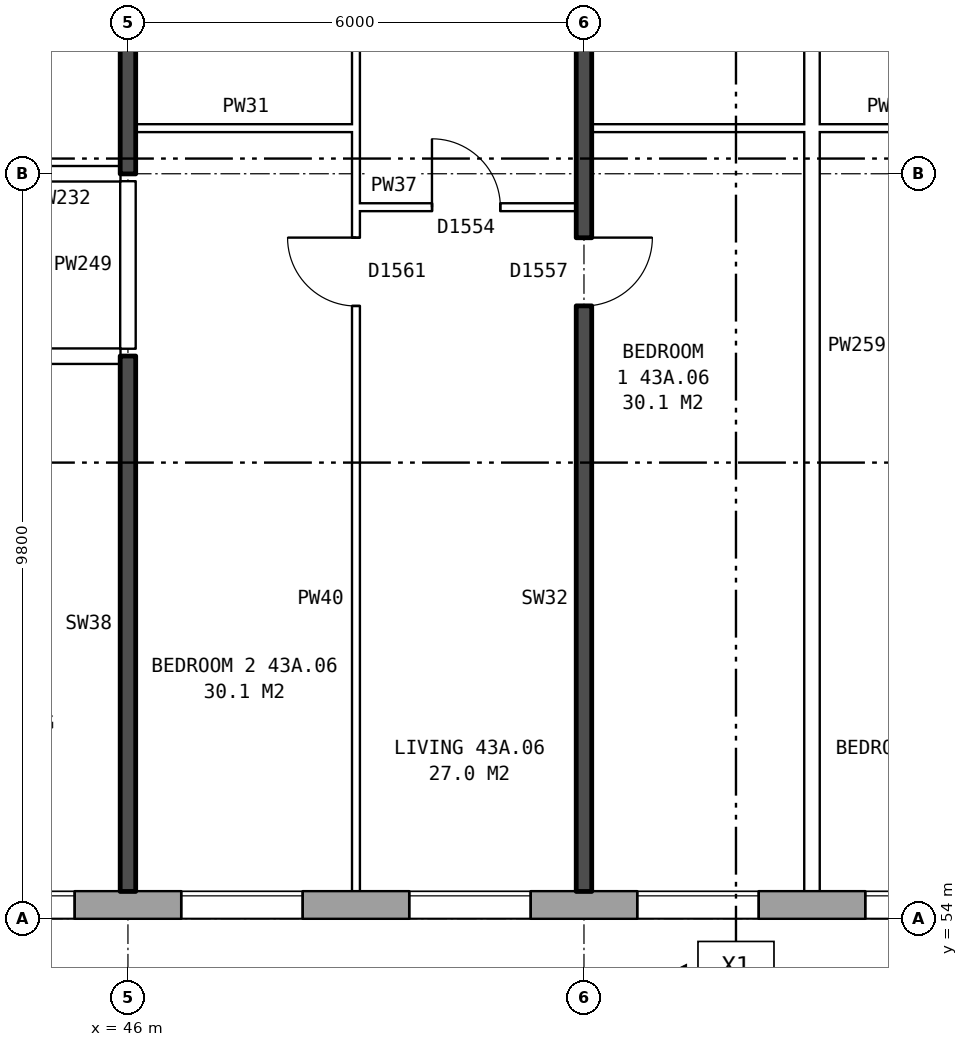
"""IFC4 building model, lengths in metres.
Left out: names, types, materials, properties, quantities, classifications, styles, units other than length and angle.
Written with IfcOpenShell. Run it as: python <this file> out.ifc"""

import sys

from ifc_helpers import new_model, si_unit, direction, frame, frame_2d, origin, place, context, subcontext, project, spatial, rectangle, extrude, element, fill, save


model = new_model("IFC4")
c1 = context("Model", 3, precision=1e-05, world=origin(), true_north=direction((0.0, 1.0)))
c2 = subcontext(c1, "Body", "Model", "MODEL_VIEW")
j1 = project(units=[si_unit("LENGTHUNIT", "METRE"), si_unit("PLANEANGLEUNIT", "RADIAN")], contexts=[c1])
p1 = place(None, origin())
s1 = spatial("IfcSite", under=j1, at=p1, CompositionType="ELEMENT")
p2 = place(p1, origin())
s2 = spatial("IfcBuilding", under=s1, at=p2, CompositionType="ELEMENT")
p3 = place(p2, frame((0.0, 0.0, 154.7)))
s3 = spatial("IfcBuildingStorey", under=s2, at=p3, CompositionType="ELEMENT", Elevation=154.7)
p4 = place(p3, frame((31.575, 54.18, 0.0), z_axis=(0.0, 0.0, 1.0), x_axis=(1.0, 0.0, 0.0)))
e1 = element("IfcWall", 1, at=p4, inside=s3, PredefinedType="STANDARD", context=c2, shape_type="SweptSolid", body=[
    extrude(rectangle(XDim=41.351, YDim=0.36, at=frame_2d((20.675, 0.0))), origin(), (0.0, 0.0, 1.0), 2.85),
])
p5 = place(p4, frame((3.125, 0.0, 0.8)))
e2 = element("IfcOpeningElement", 2, at=p5, cuts=e1, PredefinedType="OPENING", context=c2, shape_type="SweptSolid", body=[
    extrude(rectangle(XDim=1.6, YDim=1.8, at=frame_2d((0.8, 0.9))), frame((0.0, 0.19, 0.0), z_axis=(0.0, -1.0, 0.0), x_axis=(1.0, 0.0, 0.0)), (0.0, 0.0, 1.0), 0.38),
])
p6 = place(p4, frame((5.025, 0.0, 1.0)))
e3 = element("IfcOpeningElement", 3, at=p6, cuts=e1, PredefinedType="OPENING", context=c2, shape_type="SweptSolid", body=[
    extrude(rectangle(XDim=1.0, YDim=1.5, at=frame_2d((0.5, 0.75))), frame((0.0, 0.19, 0.0), z_axis=(0.0, -1.0, 0.0), x_axis=(1.0, 0.0, 0.0)), (0.0, 0.0, 1.0), 0.38),
])
p7 = place(p4, frame((9.125, 0.0, 0.8)))
e4 = element("IfcOpeningElement", 4, at=p7, cuts=e1, PredefinedType="OPENING", context=c2, shape_type="SweptSolid", body=[
    extrude(rectangle(XDim=1.6, YDim=1.8, at=frame_2d((0.8, 0.9))), frame((0.0, 0.19, 0.0), z_axis=(0.0, -1.0, 0.0), x_axis=(1.0, 0.0, 0.0)), (0.0, 0.0, 1.0), 0.38),
])
p8 = place(p4, frame((12.125, 0.0, 0.8)))
e5 = element("IfcOpeningElement", 5, at=p8, cuts=e1, PredefinedType="OPENING", context=c2, shape_type="SweptSolid", body=[
    extrude(rectangle(XDim=1.6, YDim=1.8, at=frame_2d((0.8, 0.9))), frame((0.0, 0.19, 0.0), z_axis=(0.0, -1.0, 0.0), x_axis=(1.0, 0.0, 0.0)), (0.0, 0.0, 1.0), 0.38),
])
p9 = place(p4, frame((15.125, 0.0, 0.8)))
e6 = element("IfcOpeningElement", 6, at=p9, cuts=e1, PredefinedType="OPENING", context=c2, shape_type="SweptSolid", body=[
    extrude(rectangle(XDim=1.6, YDim=1.8, at=frame_2d((0.8, 0.9))), frame((0.0, 0.19, 0.0), z_axis=(0.0, -1.0, 0.0), x_axis=(1.0, 0.0, 0.0)), (0.0, 0.0, 1.0), 0.38),
])
p10 = place(p4, frame((18.125, 0.0, 0.8)))
e7 = element("IfcOpeningElement", 7, at=p10, cuts=e1, PredefinedType="OPENING", context=c2, shape_type="SweptSolid", body=[
    extrude(rectangle(XDim=1.6, YDim=1.8, at=frame_2d((0.8, 0.9))), frame((0.0, 0.19, 0.0), z_axis=(0.0, -1.0, 0.0), x_axis=(1.0, 0.0, 0.0)), (0.0, 0.0, 1.0), 0.38),
])
p11 = place(p4, frame((21.125, 0.0, 0.8)))
e8 = element("IfcOpeningElement", 8, at=p11, cuts=e1, PredefinedType="OPENING", context=c2, shape_type="SweptSolid", body=[
    extrude(rectangle(XDim=1.6, YDim=1.8, at=frame_2d((0.8, 0.9))), frame((0.0, 0.19, 0.0), z_axis=(0.0, -1.0, 0.0), x_axis=(1.0, 0.0, 0.0)), (0.0, 0.0, 1.0), 0.38),
])
p12 = place(p4, frame((24.125, 0.0, 0.8)))
e9 = element("IfcOpeningElement", 9, at=p12, cuts=e1, PredefinedType="OPENING", context=c2, shape_type="SweptSolid", body=[
    extrude(rectangle(XDim=1.6, YDim=1.8, at=frame_2d((0.8, 0.9))), frame((0.0, 0.19, 0.0), z_axis=(0.0, -1.0, 0.0), x_axis=(1.0, 0.0, 0.0)), (0.0, 0.0, 1.0), 0.38),
])
p13 = place(p4, frame((27.125, 0.0, 0.8)))
e10 = element("IfcOpeningElement", 10, at=p13, cuts=e1, PredefinedType="OPENING", context=c2, shape_type="SweptSolid", body=[
    extrude(rectangle(XDim=1.6, YDim=1.8, at=frame_2d((0.8, 0.9))), frame((0.0, 0.19, 0.0), z_axis=(0.0, -1.0, 0.0), x_axis=(1.0, 0.0, 0.0)), (0.0, 0.0, 1.0), 0.38),
])
p14 = place(p4, frame((30.125, 0.0, 0.8)))
e11 = element("IfcOpeningElement", 11, at=p14, cuts=e1, PredefinedType="OPENING", context=c2, shape_type="SweptSolid", body=[
    extrude(rectangle(XDim=1.6, YDim=1.8, at=frame_2d((0.8, 0.9))), frame((0.0, 0.19, 0.0), z_axis=(0.0, -1.0, 0.0), x_axis=(1.0, 0.0, 0.0)), (0.0, 0.0, 1.0), 0.38),
])
p15 = place(p4, frame((34.425, 0.0, 1.7)))
e12 = element("IfcOpeningElement", 12, at=p15, cuts=e1, PredefinedType="OPENING", context=c2, shape_type="SweptSolid", body=[
    extrude(rectangle(XDim=1.4, YDim=0.9, at=frame_2d((0.7, 0.45))), frame((0.0, 0.19, 0.0), z_axis=(0.0, -1.0, 0.0), x_axis=(1.0, 0.0, 0.0)), (0.0, 0.0, 1.0), 0.38),
])
p16 = place(p4, frame((36.125, 0.0, 0.8)))
e13 = element("IfcOpeningElement", 13, at=p16, cuts=e1, PredefinedType="OPENING", context=c2, shape_type="SweptSolid", body=[
    extrude(rectangle(XDim=1.6, YDim=1.8, at=frame_2d((0.8, 0.9))), frame((0.0, 0.19, 0.0), z_axis=(0.0, -1.0, 0.0), x_axis=(1.0, 0.0, 0.0)), (0.0, 0.0, 1.0), 0.38),
])
p17 = place(p4, frame((39.125, 0.0, 0.8)))
e14 = element("IfcOpeningElement", 14, at=p17, cuts=e1, PredefinedType="OPENING", context=c2, shape_type="SweptSolid", body=[
    extrude(rectangle(XDim=1.6, YDim=1.8, at=frame_2d((0.8, 0.9))), frame((0.0, 0.19, 0.0), z_axis=(0.0, -1.0, 0.0), x_axis=(1.0, 0.0, 0.0)), (0.0, 0.0, 1.0), 0.38),
])
p18 = place(p4, frame((6.325, 0.0, 1.7)))
e15 = element("IfcOpeningElement", 15, at=p18, cuts=e1, PredefinedType="OPENING", context=c2, shape_type="SweptSolid", body=[
    extrude(rectangle(XDim=0.6, YDim=0.9, at=frame_2d((0.3, 0.45))), frame((0.0, 0.19, 0.0), z_axis=(0.0, -1.0, 0.0), x_axis=(1.0, 0.0, 0.0)), (0.0, 0.0, 1.0), 0.38),
])
p19 = place(p3, frame((28.86, 61.4, 0.0), z_axis=(0.0, 0.0, 1.0), x_axis=(1.0, 0.0, 0.0)))
e16 = element("IfcWall", 16, at=p19, inside=s3, PredefinedType="PARTITIONING", context=c2, shape_type="SweptSolid", body=[
    extrude(rectangle(XDim=17.04, YDim=0.2, at=frame_2d((8.52, 0.0))), origin(), (0.0, 0.0, 1.0), 2.85),
])
p20 = place(p19, frame((14.59, 0.0, 0.0)))
e17 = element("IfcOpeningElement", 17, at=p20, cuts=e16, PredefinedType="OPENING", context=c2, shape_type="SweptSolid", body=[
    extrude(rectangle(XDim=1.0, YDim=2.1, at=frame_2d((0.5, 1.05))), frame((0.0, 0.11, 0.0), z_axis=(0.0, -1.0, 0.0), x_axis=(1.0, 0.0, 0.0)), (0.0, 0.0, 1.0), 0.22),
])
p21 = place(p19, frame((7.64, 0.0, 0.0)))
e18 = element("IfcOpeningElement", 18, at=p21, cuts=e16, PredefinedType="OPENING", context=c2, shape_type="SweptSolid", body=[
    extrude(rectangle(XDim=1.0, YDim=2.1, at=frame_2d((0.5, 1.05))), frame((0.0, 0.11, 0.0), z_axis=(0.0, -1.0, 0.0), x_axis=(1.0, 0.0, 0.0)), (0.0, 0.0, 1.0), 0.22),
])
p22 = place(p3, frame((49.0, 63.36, 0.0), z_axis=(0.0, 0.0, 1.0), x_axis=(1.0, 0.0, 0.0)))
e19 = element("IfcWall", 19, at=p22, inside=s3, PredefinedType="PARTITIONING", context=c2, shape_type="SweptSolid", body=[
    extrude(rectangle(XDim=2.9, YDim=0.1, at=frame_2d((1.45, 0.0))), origin(), (0.0, 0.0, 1.0), 2.85),
])
p23 = place(p22, frame((1.0, 0.0, 0.0)))
e20 = element("IfcOpeningElement", 20, at=p23, cuts=e19, PredefinedType="OPENING", context=c2, shape_type="SweptSolid", body=[
    extrude(rectangle(XDim=0.9, YDim=2.1, at=frame_2d((0.45, 1.05))), frame((0.0, 0.06, 0.0), z_axis=(0.0, -1.0, 0.0), x_axis=(1.0, 0.0, 0.0)), (0.0, 0.0, 1.0), 0.12),
])
p24 = place(p3, frame((44.36, 63.8, 0.0), z_axis=(0.0, 0.0, 1.0), x_axis=(1.0, 0.0, 0.0)))
e21 = element("IfcWall", 21, at=p24, inside=s3, PredefinedType="PARTITIONING", context=c2, shape_type="SweptSolid", body=[
    extrude(rectangle(XDim=1.54, YDim=0.2, at=frame_2d((0.77, 0.0))), origin(), (0.0, 0.0, 1.0), 2.85),
])
p25 = place(p3, frame((46.1, 64.4, 0.0), z_axis=(0.0, 0.0, 1.0), x_axis=(1.0, 0.0, 0.0)))
e22 = element("IfcWall", 22, at=p25, inside=s3, PredefinedType="PARTITIONING", context=c2, shape_type="SweptSolid", body=[
    extrude(rectangle(XDim=2.9, YDim=0.1, at=frame_2d((1.45, 0.0))), origin(), (0.0, 0.0, 1.0), 2.85),
])
p26 = place(p3, frame((52.1, 64.4, 0.0), z_axis=(0.0, 0.0, 1.0), x_axis=(1.0, 0.0, 0.0)))
e23 = element("IfcWall", 23, at=p26, inside=s3, PredefinedType="PARTITIONING", context=c2, shape_type="SweptSolid", body=[
    extrude(rectangle(XDim=5.8, YDim=0.1, at=frame_2d((2.9, 0.0))), origin(), (0.0, 0.0, 1.0), 2.85),
])
p27 = place(p3, frame((46.0, 54.36, 0.0), z_axis=(0.0, 0.0, 1.0), x_axis=(0.0, 1.0, 0.0)))
e24 = element("IfcWall", 24, at=p27, inside=s3, PredefinedType="SOLIDWALL", context=c2, shape_type="SweptSolid", body=[
    extrude(rectangle(XDim=7.04, YDim=0.2, at=frame_2d((3.52, 0.0))), origin(), (0.0, 0.0, 1.0), 2.85),
])
p28 = place(p3, frame((46.0, 61.5, 0.0), z_axis=(0.0, 0.0, 1.0), x_axis=(0.0, 1.0, 0.0)))
e25 = element("IfcWall", 25, at=p28, inside=s3, PredefinedType="PARTITIONING", context=c2, shape_type="SweptSolid", body=[
    extrude(rectangle(XDim=2.2, YDim=0.2, at=frame_2d((1.1, 0.0))), origin(), (0.0, 0.0, 1.0), 2.85),
])
p29 = place(p3, frame((46.0, 63.8, 0.0), z_axis=(0.0, 0.0, 1.0), x_axis=(0.0, 1.0, 0.0)))
e26 = element("IfcWall", 26, at=p29, inside=s3, PredefinedType="SOLIDWALL", context=c2, shape_type="SweptSolid", body=[
    extrude(rectangle(XDim=5.0, YDim=0.2, at=frame_2d((2.5, 0.0))), origin(), (0.0, 0.0, 1.0), 2.85),
])
p30 = place(p3, frame((49.0, 54.36, 0.0), z_axis=(0.0, 0.0, 1.0), x_axis=(0.0, 1.0, 0.0)))
e27 = element("IfcWall", 27, at=p30, inside=s3, PredefinedType="PARTITIONING", context=c2, shape_type="SweptSolid", body=[
    extrude(rectangle(XDim=14.34, YDim=0.1, at=frame_2d((7.17, 0.0))), origin(), (0.0, 0.0, 1.0), 2.85),
])
p31 = place(p30, frame((7.7, 0.0, 0.0)))
e28 = element("IfcOpeningElement", 28, at=p31, cuts=e27, PredefinedType="OPENING", context=c2, shape_type="SweptSolid", body=[
    extrude(rectangle(XDim=0.9, YDim=2.1, at=frame_2d((0.45, 1.05))), frame((0.0, 0.06, 0.0), z_axis=(0.0, -1.0, 0.0), x_axis=(1.0, 0.0, 0.0)), (0.0, 0.0, 1.0), 0.12),
])
p32 = place(p30, frame((13.04, 0.0, 0.0)))
e29 = element("IfcOpeningElement", 29, at=p32, cuts=e27, PredefinedType="OPENING", context=c2, shape_type="SweptSolid", body=[
    extrude(rectangle(XDim=0.9, YDim=2.1, at=frame_2d((0.45, 1.05))), frame((0.0, 0.06, 0.0), z_axis=(0.0, -1.0, 0.0), x_axis=(1.0, 0.0, 0.0)), (0.0, 0.0, 1.0), 0.12),
])
p33 = place(p3, frame((52.0, 54.36, 0.0), z_axis=(0.0, 0.0, 1.0), x_axis=(0.0, 1.0, 0.0)))
e30 = element("IfcWall", 30, at=p33, inside=s3, PredefinedType="SOLIDWALL", context=c2, shape_type="SweptSolid", body=[
    extrude(rectangle(XDim=14.44, YDim=0.2, at=frame_2d((7.22, 0.0))), origin(), (0.0, 0.0, 1.0), 2.85),
])
p34 = place(p33, frame((7.7, 0.0, 0.0)))
e31 = element("IfcOpeningElement", 31, at=p34, cuts=e30, PredefinedType="OPENING", context=c2, shape_type="SweptSolid", body=[
    extrude(rectangle(XDim=0.9, YDim=2.1, at=frame_2d((0.45, 1.05))), frame((0.0, 0.11, 0.0), z_axis=(0.0, -1.0, 0.0), x_axis=(1.0, 0.0, 0.0)), (0.0, 0.0, 1.0), 0.22),
])
p35 = place(p33, frame((13.14, 0.0, 0.0)))
e32 = element("IfcOpeningElement", 32, at=p35, cuts=e30, PredefinedType="OPENING", context=c2, shape_type="SweptSolid", body=[
    extrude(rectangle(XDim=0.9, YDim=2.1, at=frame_2d((0.45, 1.05))), frame((0.0, 0.11, 0.0), z_axis=(0.0, -1.0, 0.0), x_axis=(1.0, 0.0, 0.0)), (0.0, 0.0, 1.0), 0.22),
])
p36 = place(p3, frame((55.0, 54.36, 0.0), z_axis=(0.0, 0.0, 1.0), x_axis=(0.0, 1.0, 0.0)))
e33 = element("IfcWall", 33, at=p36, inside=s3, PredefinedType="PARTITIONING", context=c2, shape_type="SweptSolid", body=[
    extrude(rectangle(XDim=14.34, YDim=0.2, at=frame_2d((7.17, 0.0))), origin(), (0.0, 0.0, 1.0), 2.85),
])
p37 = place(p8, origin())
e34 = element("IfcWindow", 34, at=p37, inside=s3, PartitioningType="SINGLE_PANEL", PredefinedType="WINDOW", context=c2, shape_type="SweptSolid", body=[
    extrude(rectangle(XDim=1.6, YDim=1.8, at=frame_2d((0.8, 0.9))), frame((0.0, 0.15, 0.0), z_axis=(0.0, -1.0, 0.0), x_axis=(1.0, 0.0, 0.0)), (0.0, 0.0, 1.0), 0.06),
])
fill(e5, e34)
p38 = place(p9, origin())
e35 = element("IfcWindow", 35, at=p38, inside=s3, PartitioningType="SINGLE_PANEL", PredefinedType="WINDOW", context=c2, shape_type="SweptSolid", body=[
    extrude(rectangle(XDim=1.6, YDim=1.8, at=frame_2d((0.8, 0.9))), frame((0.0, 0.15, 0.0), z_axis=(0.0, -1.0, 0.0), x_axis=(1.0, 0.0, 0.0)), (0.0, 0.0, 1.0), 0.06),
])
fill(e6, e35)
p39 = place(p10, origin())
e36 = element("IfcWindow", 36, at=p39, inside=s3, PartitioningType="SINGLE_PANEL", PredefinedType="WINDOW", context=c2, shape_type="SweptSolid", body=[
    extrude(rectangle(XDim=1.6, YDim=1.8, at=frame_2d((0.8, 0.9))), frame((0.0, 0.15, 0.0), z_axis=(0.0, -1.0, 0.0), x_axis=(1.0, 0.0, 0.0)), (0.0, 0.0, 1.0), 0.06),
])
fill(e7, e36)
p40 = place(p11, origin())
e37 = element("IfcWindow", 37, at=p40, inside=s3, PartitioningType="SINGLE_PANEL", PredefinedType="WINDOW", context=c2, shape_type="SweptSolid", body=[
    extrude(rectangle(XDim=1.6, YDim=1.8, at=frame_2d((0.8, 0.9))), frame((0.0, 0.15, 0.0), z_axis=(0.0, -1.0, 0.0), x_axis=(1.0, 0.0, 0.0)), (0.0, 0.0, 1.0), 0.06),
])
fill(e8, e37)
p41 = place(p12, origin())
e38 = element("IfcWindow", 38, at=p41, inside=s3, PartitioningType="SINGLE_PANEL", PredefinedType="WINDOW", context=c2, shape_type="SweptSolid", body=[
    extrude(rectangle(XDim=1.6, YDim=1.8, at=frame_2d((0.8, 0.9))), frame((0.0, 0.15, 0.0), z_axis=(0.0, -1.0, 0.0), x_axis=(1.0, 0.0, 0.0)), (0.0, 0.0, 1.0), 0.06),
])
fill(e9, e38)
p42 = place(p34, frame((0.9, 0.0, 0.0), z_axis=(0.0, 0.0, 1.0), x_axis=(-1.0, 0.0, 0.0)))
e39 = element("IfcDoor", 39, at=p42, inside=s3, OperationType="SINGLE_SWING_LEFT", PredefinedType="DOOR", context=c2, shape_type="SweptSolid", body=[
    extrude(rectangle(XDim=0.9, YDim=2.1, at=frame_2d((0.45, 1.05))), frame((0.0, 0.025, 0.0), z_axis=(0.0, -1.0, 0.0), x_axis=(1.0, 0.0, 0.0)), (0.0, 0.0, 1.0), 0.05),
])
fill(e31, e39)
p43 = place(p31, origin())
e40 = element("IfcDoor", 40, at=p43, inside=s3, OperationType="SINGLE_SWING_RIGHT", PredefinedType="DOOR", context=c2, shape_type="SweptSolid", body=[
    extrude(rectangle(XDim=0.9, YDim=2.1, at=frame_2d((0.45, 1.05))), frame((0.0, 0.025, 0.0), z_axis=(0.0, -1.0, 0.0), x_axis=(1.0, 0.0, 0.0)), (0.0, 0.0, 1.0), 0.05),
])
fill(e28, e40)
p44 = place(p23, origin())
e41 = element("IfcDoor", 41, at=p44, inside=s3, OperationType="SINGLE_SWING_LEFT", PredefinedType="DOOR", context=c2, shape_type="SweptSolid", body=[
    extrude(rectangle(XDim=0.9, YDim=2.1, at=frame_2d((0.45, 1.05))), frame((0.0, 0.025, 0.0), z_axis=(0.0, -1.0, 0.0), x_axis=(1.0, 0.0, 0.0)), (0.0, 0.0, 1.0), 0.05),
])
fill(e20, e41)
save(model, sys.argv[1])
